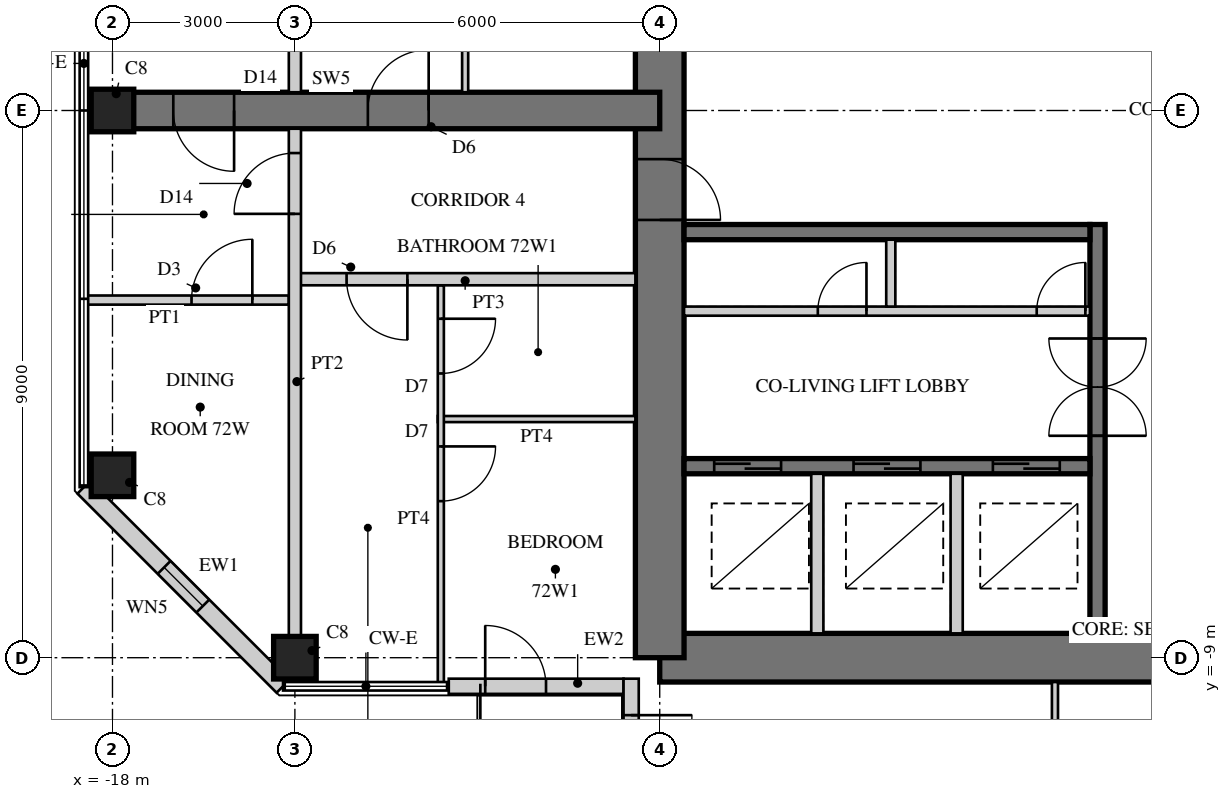
"""IFC4 building model, lengths in metres.
Left out: names, types, materials, properties, quantities, classifications, styles, units other than length and angle.
Written with IfcOpenShell. Run it as: python <this file> out.ifc"""

import sys

from ifc_helpers import new_model, si_unit, direction, frame, frame_2d, origin, origin_2d, place, context, subcontext, project, spatial, rectangle, hollow_rectangle, extrude, element, fill, save


model = new_model("IFC4")
c1 = context("Model", 3, precision=1e-05, world=origin(), true_north=direction((0.0, 1.0)))
c2 = subcontext(c1, "Body", "Model", "MODEL_VIEW")
j1 = project(units=[si_unit("LENGTHUNIT", "METRE"), si_unit("PLANEANGLEUNIT", "RADIAN")], contexts=[c1])
p1 = place(None, origin())
s1 = spatial("IfcSite", under=j1, at=p1, CompositionType="ELEMENT")
p2 = place(p1, origin())
s2 = spatial("IfcBuilding", under=s1, at=p2, CompositionType="ELEMENT")
p3 = place(p2, frame((0.0, 0.0, 278.1)))
s3 = spatial("IfcBuildingStorey", under=s2, at=p3, CompositionType="ELEMENT", Elevation=278.1)
p4 = place(p3, frame((-9.0, -9.0, 0.0), z_axis=(0.0, 0.0, 1.0), x_axis=(1.0, 0.0, 0.0)))
e1 = element("IfcWall", 1, at=p4, inside=s3, PredefinedType="SHEAR", context=c2, shape_type="SweptSolid", body=[
    extrude(rectangle(XDim=18.0, YDim=0.8, at=frame_2d((9.0, 0.0))), origin(), (0.0, 0.0, 1.0), 3.4),
])
p5 = place(p4, frame((9.8, 0.0, 0.0)))
e2 = element("IfcOpeningElement", 2, at=p5, cuts=e1, PredefinedType="OPENING", context=c2, shape_type="SweptSolid", body=[
    extrude(rectangle(XDim=1.0, YDim=2.4, at=frame_2d((0.5, 1.2))), frame((0.0, 0.41, 0.0), z_axis=(0.0, -1.0, 0.0), x_axis=(1.0, 0.0, 0.0)), (0.0, 0.0, 1.0), 0.82),
])
p6 = place(p3, frame((-9.0, 9.0, 0.0), z_axis=(0.0, 0.0, 1.0), x_axis=(0.0, -1.0, 0.0)))
e3 = element("IfcWall", 3, at=p6, inside=s3, PredefinedType="SHEAR", context=c2, shape_type="SweptSolid", body=[
    extrude(rectangle(XDim=18.0, YDim=0.8, at=frame_2d((9.0, 0.0))), origin(), (0.0, 0.0, 1.0), 3.4),
])
p7 = place(p6, frame((9.8, 0.0, 0.0)))
e4 = element("IfcOpeningElement", 4, at=p7, cuts=e3, PredefinedType="OPENING", context=c2, shape_type="SweptSolid", body=[
    extrude(rectangle(XDim=1.0, YDim=2.4, at=frame_2d((0.5, 1.2))), frame((0.0, 0.41, 0.0), z_axis=(0.0, -1.0, 0.0), x_axis=(1.0, 0.0, 0.0)), (0.0, 0.0, 1.0), 0.82),
])
p8 = place(p3, frame((-1.8, -1.875, 0.0), z_axis=(0.0, 0.0, 1.0), x_axis=(0.0, -1.0, 0.0)))
e5 = element("IfcWall", 5, at=p8, inside=s3, PredefinedType="SHEAR", context=c2, shape_type="SweptSolid", body=[
    extrude(rectangle(XDim=6.725, YDim=0.25, at=frame_2d((3.363, 0.0))), origin(), (0.0, 0.0, 1.0), 3.4),
])
p9 = place(p8, frame((1.875, 0.0, 0.0)))
e6 = element("IfcOpeningElement", 6, at=p9, cuts=e5, PredefinedType="OPENING", context=c2, shape_type="SweptSolid", body=[
    extrude(rectangle(XDim=1.6, YDim=2.4, at=frame_2d((0.8, 1.2))), frame((0.0, 0.135, 0.0), z_axis=(0.0, -1.0, 0.0), x_axis=(1.0, 0.0, 0.0)), (0.0, 0.0, 1.0), 0.27),
])
p10 = place(p3, frame((-1.925, -2.0, 0.0), z_axis=(0.0, 0.0, 1.0), x_axis=(-1.0, 0.0, 0.0)))
e7 = element("IfcWall", 7, at=p10, inside=s3, PredefinedType="SHEAR", context=c2, shape_type="SweptSolid", body=[
    extrude(rectangle(XDim=6.675, YDim=0.25, at=frame_2d((3.337, 0.0))), origin(), (0.0, 0.0, 1.0), 3.4),
])
p11 = place(p3, frame((-1.925, -5.85, 0.0), z_axis=(0.0, 0.0, 1.0), x_axis=(-1.0, 0.0, 0.0)))
e8 = element("IfcWall", 8, at=p11, inside=s3, PredefinedType="SHEAR", context=c2, shape_type="SweptSolid", body=[
    extrude(rectangle(XDim=6.675, YDim=0.25, at=frame_2d((3.337, 0.0))), origin(), (0.0, 0.0, 1.0), 3.4),
])
p12 = place(p11, frame((0.496, 0.0, 0.0)))
e9 = element("IfcOpeningElement", 9, at=p12, cuts=e8, PredefinedType="OPENING", context=c2, shape_type="SweptSolid", body=[
    extrude(rectangle(XDim=1.1, YDim=2.2, at=frame_2d((0.55, 1.1))), frame((0.0, 0.135, 0.0), z_axis=(0.0, -1.0, 0.0), x_axis=(1.0, 0.0, 0.0)), (0.0, 0.0, 1.0), 0.27),
])
p13 = place(p11, frame((2.788, 0.0, 0.0)))
e10 = element("IfcOpeningElement", 10, at=p13, cuts=e8, PredefinedType="OPENING", context=c2, shape_type="SweptSolid", body=[
    extrude(rectangle(XDim=1.1, YDim=2.2, at=frame_2d((0.55, 1.1))), frame((0.0, 0.135, 0.0), z_axis=(0.0, -1.0, 0.0), x_axis=(1.0, 0.0, 0.0)), (0.0, 0.0, 1.0), 0.27),
])
p14 = place(p11, frame((5.079, 0.0, 0.0)))
e11 = element("IfcOpeningElement", 11, at=p14, cuts=e8, PredefinedType="OPENING", context=c2, shape_type="SweptSolid", body=[
    extrude(rectangle(XDim=1.1, YDim=2.2, at=frame_2d((0.55, 1.1))), frame((0.0, 0.135, 0.0), z_axis=(0.0, -1.0, 0.0), x_axis=(1.0, 0.0, 0.0)), (0.0, 0.0, 1.0), 0.27),
])
p15 = place(p3, frame((-1.925, -3.3, 0.0), z_axis=(0.0, 0.0, 1.0), x_axis=(-1.0, 0.0, 0.0)))
e12 = element("IfcWall", 12, at=p15, inside=s3, PredefinedType="PARTITIONING", context=c2, shape_type="SweptSolid", body=[
    extrude(rectangle(XDim=6.675, YDim=0.15, at=frame_2d((3.337, 0.0))), origin(), (0.0, 0.0, 1.0), 3.4),
])
p16 = place(p15, frame((0.075, 0.0, 0.0)))
e13 = element("IfcOpeningElement", 13, at=p16, cuts=e12, PredefinedType="OPENING", context=c2, shape_type="SweptSolid", body=[
    extrude(rectangle(XDim=0.8, YDim=2.1, at=frame_2d((0.4, 1.05))), frame((0.0, 0.085, 0.0), z_axis=(0.0, -1.0, 0.0), x_axis=(1.0, 0.0, 0.0)), (0.0, 0.0, 1.0), 0.17),
])
p17 = place(p15, frame((3.675, 0.0, 0.0)))
e14 = element("IfcOpeningElement", 14, at=p17, cuts=e12, PredefinedType="OPENING", context=c2, shape_type="SweptSolid", body=[
    extrude(rectangle(XDim=0.8, YDim=2.1, at=frame_2d((0.4, 1.05))), frame((0.0, 0.085, 0.0), z_axis=(0.0, -1.0, 0.0), x_axis=(1.0, 0.0, 0.0)), (0.0, 0.0, 1.0), 0.17),
])
p18 = place(p3, frame((-5.2, -2.125, 0.0), z_axis=(0.0, 0.0, 1.0), x_axis=(0.0, -1.0, 0.0)))
e15 = element("IfcWall", 15, at=p18, inside=s3, PredefinedType="PARTITIONING", context=c2, shape_type="SweptSolid", body=[
    extrude(rectangle(XDim=1.1, YDim=0.15, at=frame_2d((0.55, 0.0))), origin(), (0.0, 0.0, 1.0), 3.4),
])
for number, where, z_axis, x_axis in (
    (16, (-4.117, -5.975, 0.0), (0.0, 0.0, 1.0), (0.0, -1.0, 0.0)),
    (17, (-6.408, -5.975, 0.0), (0.0, 0.0, 1.0), (0.0, -1.0, 0.0)),
):
    element("IfcWall", number, at=place(p3, frame(where, z_axis=z_axis, x_axis=x_axis)), inside=s3, PredefinedType="PARTITIONING", context=c2, shape_type="SweptSolid", body=[
        extrude(rectangle(XDim=2.625, YDim=0.2, at=frame_2d((1.312, 0.0))), origin(), (0.0, 0.0, 1.0), 3.4),
    ])
p19 = place(p3, frame((-9.0, 0.0, 0.0), z_axis=(0.0, 0.0, 1.0), x_axis=(-1.0, 0.0, 0.0)))
e18 = element("IfcWall", 18, at=p19, inside=s3, PredefinedType="SHEAR", context=c2, shape_type="SweptSolid", body=[
    extrude(rectangle(XDim=9.0, YDim=0.6, at=frame_2d((4.5, 0.0))), origin(), (0.0, 0.0, 1.0), 3.4),
])
p20 = place(p19, frame((3.8, 0.0, 0.0)))
e19 = element("IfcOpeningElement", 19, at=p20, cuts=e18, PredefinedType="OPENING", context=c2, shape_type="SweptSolid", body=[
    extrude(rectangle(XDim=1.0, YDim=2.15, at=frame_2d((0.5, 1.075))), frame((0.0, 0.31, 0.0), z_axis=(0.0, -1.0, 0.0), x_axis=(1.0, 0.0, 0.0)), (0.0, 0.0, 1.0), 0.62),
])
p21 = place(p19, frame((7.0, 0.0, 0.0)))
e20 = element("IfcOpeningElement", 20, at=p21, cuts=e18, PredefinedType="OPENING", context=c2, shape_type="SweptSolid", body=[
    extrude(rectangle(XDim=1.0, YDim=2.2, at=frame_2d((0.5, 1.1))), frame((0.0, 0.31, 0.0), z_axis=(0.0, -1.0, 0.0), x_axis=(1.0, 0.0, 0.0)), (0.0, 0.0, 1.0), 0.62),
])
for number, where, z_axis, x_axis in (
    (21, (-15.0, -9.0, 0.0), (0.0, 0.0, 1.0), (1.0, 0.0, 0.0)),
    (22, (-18.0, 0.0, 0.0), (0.0, 0.0, 1.0), (1.0, 0.0, 0.0)),
    (23, (-18.0, -6.0, 0.0), (0.0, 0.0, 1.0), (1.0, 0.0, 0.0)),
):
    element("IfcColumn", number, at=place(p3, frame(where, z_axis=z_axis, x_axis=x_axis)), inside=s3, PredefinedType="COLUMN", context=c2, shape_type="SweptSolid", body=[
        extrude(rectangle(XDim=0.7, YDim=0.7, at=origin_2d()), origin(), (0.0, 0.0, 1.0), 3.4),
    ])
p22 = place(p3, frame((-18.47, -6.195, 0.0), z_axis=(0.0, 0.0, 1.0), x_axis=(0.707106781187, -0.707106781187, 0.0)))
e24 = element("IfcWall", 24, at=p22, inside=s3, PredefinedType="SOLIDWALL", context=c2, shape_type="SweptSolid", body=[
    extrude(rectangle(XDim=4.632, YDim=0.3, at=frame_2d((2.316, 0.0))), origin(), (0.0, 0.0, 1.0), 3.22),
])
p23 = place(p22, frame((1.866, 0.0, 0.3)))
e25 = element("IfcOpeningElement", 25, at=p23, cuts=e24, PredefinedType="OPENING", context=c2, shape_type="SweptSolid", body=[
    extrude(rectangle(XDim=0.9, YDim=2.4, at=frame_2d((0.45, 1.2))), frame((0.0, 0.16, 0.0), z_axis=(0.0, -1.0, 0.0), x_axis=(1.0, 0.0, 0.0)), (0.0, 0.0, 1.0), 0.32),
])
p24 = place(p3, frame((-12.47, -9.47, 0.0), z_axis=(0.0, 0.0, 1.0), x_axis=(1.0, 0.0, 0.0)))
e26 = element("IfcWall", 26, at=p24, inside=s3, PredefinedType="SOLIDWALL", context=c2, shape_type="SweptSolid", body=[
    extrude(rectangle(XDim=2.875, YDim=0.25, at=frame_2d((1.438, 0.0))), origin(), (0.0, 0.0, 1.0), 3.22),
])
p25 = place(p24, frame((0.6, 0.0, 0.0)))
e27 = element("IfcOpeningElement", 27, at=p25, cuts=e26, PredefinedType="OPENING", context=c2, shape_type="SweptSolid", body=[
    extrude(rectangle(XDim=1.0, YDim=2.2, at=frame_2d((0.5, 1.1))), frame((0.0, 0.135, 0.0), z_axis=(0.0, -1.0, 0.0), x_axis=(1.0, 0.0, 0.0)), (0.0, 0.0, 1.0), 0.27),
])
p26 = place(p3, frame((-9.47, -9.345, 0.0), z_axis=(0.0, 0.0, 1.0), x_axis=(0.0, -1.0, 0.0)))
e28 = element("IfcWall", 28, at=p26, inside=s3, PredefinedType="SOLIDWALL", context=c2, shape_type="SweptSolid", body=[
    extrude(rectangle(XDim=3.125, YDim=0.25, at=frame_2d((1.562, 0.0))), origin(), (0.0, 0.0, 1.0), 3.22),
])
p27 = place(p26, frame((0.6, 0.0, 0.0)))
e29 = element("IfcOpeningElement", 29, at=p27, cuts=e28, PredefinedType="OPENING", context=c2, shape_type="SweptSolid", body=[
    extrude(rectangle(XDim=1.0, YDim=2.2, at=frame_2d((0.5, 1.1))), frame((0.0, 0.135, 0.0), z_axis=(0.0, -1.0, 0.0), x_axis=(1.0, 0.0, 0.0)), (0.0, 0.0, 1.0), 0.27),
])
p28 = place(p3, frame((-2.5, -9.4, 0.0), z_axis=(0.0, 0.0, 1.0), x_axis=(0.0, -1.0, 0.0)))
e30 = element("IfcWall", 30, at=p28, inside=s3, PredefinedType="PARTITIONING", context=c2, shape_type="SweptSolid", body=[
    extrude(rectangle(XDim=2.65, YDim=0.1, at=frame_2d((1.325, 0.0))), origin(), (0.0, 0.0, 1.0), 3.22),
])
p29 = place(p3, frame((-9.4, -5.075, 0.0), z_axis=(0.0, 0.0, 1.0), x_axis=(-1.0, 0.0, 0.0)))
e31 = element("IfcWall", 31, at=p29, inside=s3, PredefinedType="PARTITIONING", context=c2, shape_type="SweptSolid", body=[
    extrude(rectangle(XDim=3.25, YDim=0.1, at=frame_2d((1.625, 0.0))), origin(), (0.0, 0.0, 1.0), 3.22),
])
p30 = place(p3, frame((-12.6, -2.875, 0.0), z_axis=(0.0, 0.0, 1.0), x_axis=(0.0, -1.0, 0.0)))
e32 = element("IfcWall", 32, at=p30, inside=s3, PredefinedType="PARTITIONING", context=c2, shape_type="SweptSolid", body=[
    extrude(rectangle(XDim=6.555, YDim=0.1, at=frame_2d((3.277, 0.0))), origin(), (0.0, 0.0, 1.0), 3.22),
])
p31 = place(p30, frame((0.55, 0.0, 0.0)))
e33 = element("IfcOpeningElement", 33, at=p31, cuts=e32, PredefinedType="OPENING", context=c2, shape_type="SweptSolid", body=[
    extrude(rectangle(XDim=0.9, YDim=2.1, at=frame_2d((0.45, 1.05))), frame((0.0, 0.06, 0.0), z_axis=(0.0, -1.0, 0.0), x_axis=(1.0, 0.0, 0.0)), (0.0, 0.0, 1.0), 0.12),
])
p32 = place(p30, frame((2.65, 0.0, 0.0)))
e34 = element("IfcOpeningElement", 34, at=p32, cuts=e32, PredefinedType="OPENING", context=c2, shape_type="SweptSolid", body=[
    extrude(rectangle(XDim=0.9, YDim=2.1, at=frame_2d((0.45, 1.05))), frame((0.0, 0.06, 0.0), z_axis=(0.0, -1.0, 0.0), x_axis=(1.0, 0.0, 0.0)), (0.0, 0.0, 1.0), 0.12),
])
p33 = place(p3, frame((-12.2, 2.9, 0.0), z_axis=(0.0, 0.0, 1.0), x_axis=(0.0, -1.0, 0.0)))
e35 = element("IfcWall", 35, at=p33, inside=s3, PredefinedType="PARTITIONING", context=c2, shape_type="SweptSolid", body=[
    extrude(rectangle(XDim=2.6, YDim=0.1, at=frame_2d((1.3, 0.0))), origin(), (0.0, 0.0, 1.0), 3.22),
])
p34 = place(p33, frame((0.55, 0.0, 0.0)))
e36 = element("IfcOpeningElement", 36, at=p34, cuts=e35, PredefinedType="OPENING", context=c2, shape_type="SweptSolid", body=[
    extrude(rectangle(XDim=0.9, YDim=2.1, at=frame_2d((0.45, 1.05))), frame((0.0, 0.06, 0.0), z_axis=(0.0, -1.0, 0.0), x_axis=(1.0, 0.0, 0.0)), (0.0, 0.0, 1.0), 0.12),
])
p35 = place(p3, frame((-9.4, -2.775, 0.0), z_axis=(0.0, 0.0, 1.0), x_axis=(-1.0, 0.0, 0.0)))
e37 = element("IfcWall", 37, at=p35, inside=s3, PredefinedType="SOLIDWALL", context=c2, shape_type="SweptSolid", body=[
    extrude(rectangle(XDim=5.6, YDim=0.2, at=frame_2d((2.8, 0.0))), origin(), (0.0, 0.0, 1.0), 3.22),
])
p36 = place(p35, frame((3.75, 0.0, 0.0)))
e38 = element("IfcOpeningElement", 38, at=p36, cuts=e37, PredefinedType="OPENING", context=c2, shape_type="SweptSolid", body=[
    extrude(rectangle(XDim=1.0, YDim=2.15, at=frame_2d((0.5, 1.075))), frame((0.0, 0.11, 0.0), z_axis=(0.0, -1.0, 0.0), x_axis=(1.0, 0.0, 0.0)), (0.0, 0.0, 1.0), 0.22),
])
p37 = place(p3, frame((-15.1, -3.118, 0.0), z_axis=(0.0, 0.0, 1.0), x_axis=(-1.0, 0.0, 0.0)))
e39 = element("IfcWall", 39, at=p37, inside=s3, PredefinedType="PARTITIONING", context=c2, shape_type="SweptSolid", body=[
    extrude(rectangle(XDim=3.33, YDim=0.15, at=frame_2d((1.665, 0.0))), origin(), (0.0, 0.0, 1.0), 3.22),
])
p38 = place(p37, frame((0.6, 0.0, 0.0)))
e40 = element("IfcOpeningElement", 40, at=p38, cuts=e39, PredefinedType="OPENING", context=c2, shape_type="SweptSolid", body=[
    extrude(rectangle(XDim=1.0, YDim=2.1, at=frame_2d((0.5, 1.05))), frame((0.0, 0.085, 0.0), z_axis=(0.0, -1.0, 0.0), x_axis=(1.0, 0.0, 0.0)), (0.0, 0.0, 1.0), 0.17),
])
p39 = place(p3, frame((-15.0, 8.65, 0.0), z_axis=(0.0, 0.0, 1.0), x_axis=(0.0, -1.0, 0.0)))
e41 = element("IfcWall", 41, at=p39, inside=s3, PredefinedType="SOLIDWALL", context=c2, shape_type="SweptSolid", body=[
    extrude(rectangle(XDim=8.35, YDim=0.2, at=frame_2d((4.175, 0.0))), origin(), (0.0, 0.0, 1.0), 2.52),
])
p40 = place(p3, frame((-15.0, -0.3, 0.0), z_axis=(0.0, 0.0, 1.0), x_axis=(0.0, -1.0, 0.0)))
e42 = element("IfcWall", 42, at=p40, inside=s3, PredefinedType="SOLIDWALL", context=c2, shape_type="SweptSolid", body=[
    extrude(rectangle(XDim=8.35, YDim=0.2, at=frame_2d((4.175, 0.0))), origin(), (0.0, 0.0, 1.0), 2.52),
])
p41 = place(p40, frame((0.4, 0.0, 0.0)))
e43 = element("IfcOpeningElement", 43, at=p41, cuts=e42, PredefinedType="OPENING", context=c2, shape_type="SweptSolid", body=[
    extrude(rectangle(XDim=1.0, YDim=2.2, at=frame_2d((0.5, 1.1))), frame((0.0, 0.11, 0.0), z_axis=(0.0, -1.0, 0.0), x_axis=(1.0, 0.0, 0.0)), (0.0, 0.0, 1.0), 0.22),
])
p42 = place(p23, origin())
e44 = element("IfcWindow", 44, at=p42, inside=s3, PartitioningType="SINGLE_PANEL", PredefinedType="WINDOW", context=c2, shape_type="SweptSolid", body=[
    extrude(hollow_rectangle(XDim=0.9, YDim=2.4, WallThickness=0.06, at=frame_2d((0.45, 1.2))), frame((0.0, 0.03, 0.0), z_axis=(0.0, -1.0, 0.0), x_axis=(1.0, 0.0, 0.0)), (0.0, 0.0, 1.0), 0.06),
    extrude(rectangle(XDim=0.779, YDim=2.279, at=frame_2d((0.45, 1.2))), frame((0.0, 0.03, 0.0), z_axis=(0.0, -1.0, 0.0), x_axis=(1.0, 0.0, 0.0)), (0.0, 0.0, 1.0), 0.06),
])
fill(e25, e44)
p43 = place(p25, origin())
e45 = element("IfcDoor", 45, at=p43, inside=s3, OperationType="SINGLE_SWING_LEFT", PredefinedType="DOOR", context=c2, shape_type="SweptSolid", body=[
    extrude(hollow_rectangle(XDim=1.0, YDim=2.2, WallThickness=0.06, at=frame_2d((0.5, 1.1))), frame((0.0, 0.025, 0.0), z_axis=(0.0, -1.0, 0.0), x_axis=(1.0, 0.0, 0.0)), (0.0, 0.0, 1.0), 0.05),
    extrude(rectangle(XDim=0.879, YDim=2.079, at=frame_2d((0.5, 1.1))), frame((0.0, 0.025, 0.0), z_axis=(0.0, -1.0, 0.0), x_axis=(1.0, 0.0, 0.0)), (0.0, 0.0, 1.0), 0.05),
])
fill(e27, e45)
p44 = place(p27, origin())
e46 = element("IfcDoor", 46, at=p44, inside=s3, OperationType="SINGLE_SWING_LEFT", PredefinedType="DOOR", context=c2, shape_type="SweptSolid", body=[
    extrude(hollow_rectangle(XDim=1.0, YDim=2.2, WallThickness=0.06, at=frame_2d((0.5, 1.1))), frame((0.0, 0.025, 0.0), z_axis=(0.0, -1.0, 0.0), x_axis=(1.0, 0.0, 0.0)), (0.0, 0.0, 1.0), 0.05),
    extrude(rectangle(XDim=0.879, YDim=2.079, at=frame_2d((0.5, 1.1))), frame((0.0, 0.025, 0.0), z_axis=(0.0, -1.0, 0.0), x_axis=(1.0, 0.0, 0.0)), (0.0, 0.0, 1.0), 0.05),
])
fill(e29, e46)
p45 = place(p31, origin())
e47 = element("IfcDoor", 47, at=p45, inside=s3, OperationType="SINGLE_SWING_LEFT", PredefinedType="DOOR", context=c2, shape_type="SweptSolid", body=[
    extrude(rectangle(XDim=0.9, YDim=2.1, at=frame_2d((0.45, 1.05))), frame((0.0, 0.025, 0.0), z_axis=(0.0, -1.0, 0.0), x_axis=(1.0, 0.0, 0.0)), (0.0, 0.0, 1.0), 0.05),
])
fill(e33, e47)
p46 = place(p32, origin())
e48 = element("IfcDoor", 48, at=p46, inside=s3, OperationType="SINGLE_SWING_LEFT", PredefinedType="DOOR", context=c2, shape_type="SweptSolid", body=[
    extrude(rectangle(XDim=0.9, YDim=2.1, at=frame_2d((0.45, 1.05))), frame((0.0, 0.025, 0.0), z_axis=(0.0, -1.0, 0.0), x_axis=(1.0, 0.0, 0.0)), (0.0, 0.0, 1.0), 0.05),
])
fill(e34, e48)
p47 = place(p36, origin())
e49 = element("IfcDoor", 49, at=p47, inside=s3, OperationType="SINGLE_SWING_LEFT", PredefinedType="DOOR", context=c2, shape_type="SweptSolid", body=[
    extrude(rectangle(XDim=1.0, YDim=2.15, at=frame_2d((0.5, 1.075))), frame((0.0, 0.025, 0.0), z_axis=(0.0, -1.0, 0.0), x_axis=(1.0, 0.0, 0.0)), (0.0, 0.0, 1.0), 0.05),
])
fill(e38, e49)
p48 = place(p38, frame((1.0, 0.0, 0.0), z_axis=(0.0, 0.0, 1.0), x_axis=(-1.0, 0.0, 0.0)))
e50 = element("IfcDoor", 50, at=p48, inside=s3, OperationType="SINGLE_SWING_RIGHT", PredefinedType="DOOR", context=c2, shape_type="SweptSolid", body=[
    extrude(rectangle(XDim=1.0, YDim=2.1, at=frame_2d((0.5, 1.05))), frame((0.0, 0.025, 0.0), z_axis=(0.0, -1.0, 0.0), x_axis=(1.0, 0.0, 0.0)), (0.0, 0.0, 1.0), 0.05),
])
fill(e40, e50)
p49 = place(p41, frame((1.0, 0.0, 0.0), z_axis=(0.0, 0.0, 1.0), x_axis=(-1.0, 0.0, 0.0)))
e51 = element("IfcDoor", 51, at=p49, inside=s3, OperationType="SINGLE_SWING_LEFT", PredefinedType="DOOR", context=c2, shape_type="SweptSolid", body=[
    extrude(rectangle(XDim=1.0, YDim=2.2, at=frame_2d((0.5, 1.1))), frame((0.0, 0.025, 0.0), z_axis=(0.0, -1.0, 0.0), x_axis=(1.0, 0.0, 0.0)), (0.0, 0.0, 1.0), 0.05),
])
fill(e43, e51)
p50 = place(p20, frame((1.0, 0.0, 0.0), z_axis=(0.0, 0.0, 1.0), x_axis=(-1.0, 0.0, 0.0)))
e52 = element("IfcDoor", 52, at=p50, inside=s3, OperationType="SINGLE_SWING_RIGHT", PredefinedType="DOOR", context=c2, shape_type="SweptSolid", body=[
    extrude(rectangle(XDim=1.0, YDim=2.15, at=frame_2d((0.5, 1.075))), frame((0.0, 0.025, 0.0), z_axis=(0.0, -1.0, 0.0), x_axis=(1.0, 0.0, 0.0)), (0.0, 0.0, 1.0), 0.05),
])
fill(e19, e52)
p51 = place(p21, origin())
e53 = element("IfcDoor", 53, at=p51, inside=s3, OperationType="SINGLE_SWING_LEFT", PredefinedType="DOOR", context=c2, shape_type="SweptSolid", body=[
    extrude(rectangle(XDim=1.0, YDim=2.2, at=frame_2d((0.5, 1.1))), frame((0.0, 0.025, 0.0), z_axis=(0.0, -1.0, 0.0), x_axis=(1.0, 0.0, 0.0)), (0.0, 0.0, 1.0), 0.05),
])
fill(e20, e53)
p52 = place(p7, origin())
e54 = element("IfcDoor", 54, at=p52, inside=s3, OperationType="SINGLE_SWING_RIGHT", PredefinedType="DOOR", context=c2, shape_type="SweptSolid", body=[
    extrude(rectangle(XDim=1.0, YDim=2.4, at=frame_2d((0.5, 1.2))), frame((0.0, 0.055, 0.0), z_axis=(0.0, -1.0, 0.0), x_axis=(1.0, 0.0, 0.0)), (0.0, 0.0, 1.0), 0.05),
])
fill(e4, e54)
p53 = place(p12, origin())
e55 = element("IfcDoor", 55, at=p53, inside=s3, OperationType="DOUBLE_DOOR_SLIDING", PredefinedType="DOOR", context=c2, shape_type="SweptSolid", body=[
    extrude(rectangle(XDim=1.1, YDim=2.2, at=frame_2d((0.55, 1.1))), frame((0.0, 0.025, 0.0), z_axis=(0.0, -1.0, 0.0), x_axis=(1.0, 0.0, 0.0)), (0.0, 0.0, 1.0), 0.05),
])
fill(e9, e55)
p54 = place(p13, origin())
e56 = element("IfcDoor", 56, at=p54, inside=s3, OperationType="DOUBLE_DOOR_SLIDING", PredefinedType="DOOR", context=c2, shape_type="SweptSolid", body=[
    extrude(rectangle(XDim=1.1, YDim=2.2, at=frame_2d((0.55, 1.1))), frame((0.0, 0.025, 0.0), z_axis=(0.0, -1.0, 0.0), x_axis=(1.0, 0.0, 0.0)), (0.0, 0.0, 1.0), 0.05),
])
fill(e10, e56)
p55 = place(p14, origin())
e57 = element("IfcDoor", 57, at=p55, inside=s3, OperationType="DOUBLE_DOOR_SLIDING", PredefinedType="DOOR", context=c2, shape_type="SweptSolid", body=[
    extrude(rectangle(XDim=1.1, YDim=2.2, at=frame_2d((0.55, 1.1))), frame((0.0, 0.025, 0.0), z_axis=(0.0, -1.0, 0.0), x_axis=(1.0, 0.0, 0.0)), (0.0, 0.0, 1.0), 0.05),
])
fill(e11, e57)
p56 = place(p9, origin())
e58 = element("IfcDoor", 58, at=p56, inside=s3, OperationType="DOUBLE_DOOR_DOUBLE_SWING", PredefinedType="DOOR", context=c2, shape_type="SweptSolid", body=[
    extrude(rectangle(XDim=1.6, YDim=2.4, at=frame_2d((0.8, 1.2))), frame((0.0, 0.025, 0.0), z_axis=(0.0, -1.0, 0.0), x_axis=(1.0, 0.0, 0.0)), (0.0, 0.0, 1.0), 0.05),
])
fill(e6, e58)
p57 = place(p16, frame((0.8, 0.0, 0.0), z_axis=(0.0, 0.0, 1.0), x_axis=(-1.0, 0.0, 0.0)))
e59 = element("IfcDoor", 59, at=p57, inside=s3, OperationType="SINGLE_SWING_RIGHT", PredefinedType="DOOR", context=c2, shape_type="SweptSolid", body=[
    extrude(rectangle(XDim=0.8, YDim=2.1, at=frame_2d((0.4, 1.05))), frame((0.0, 0.025, 0.0), z_axis=(0.0, -1.0, 0.0), x_axis=(1.0, 0.0, 0.0)), (0.0, 0.0, 1.0), 0.05),
])
fill(e13, e59)
p58 = place(p17, frame((0.8, 0.0, 0.0), z_axis=(0.0, 0.0, 1.0), x_axis=(-1.0, 0.0, 0.0)))
e60 = element("IfcDoor", 60, at=p58, inside=s3, OperationType="SINGLE_SWING_RIGHT", PredefinedType="DOOR", context=c2, shape_type="SweptSolid", body=[
    extrude(rectangle(XDim=0.8, YDim=2.1, at=frame_2d((0.4, 1.05))), frame((0.0, 0.025, 0.0), z_axis=(0.0, -1.0, 0.0), x_axis=(1.0, 0.0, 0.0)), (0.0, 0.0, 1.0), 0.05),
])
fill(e14, e60)
save(model, sys.argv[1])
